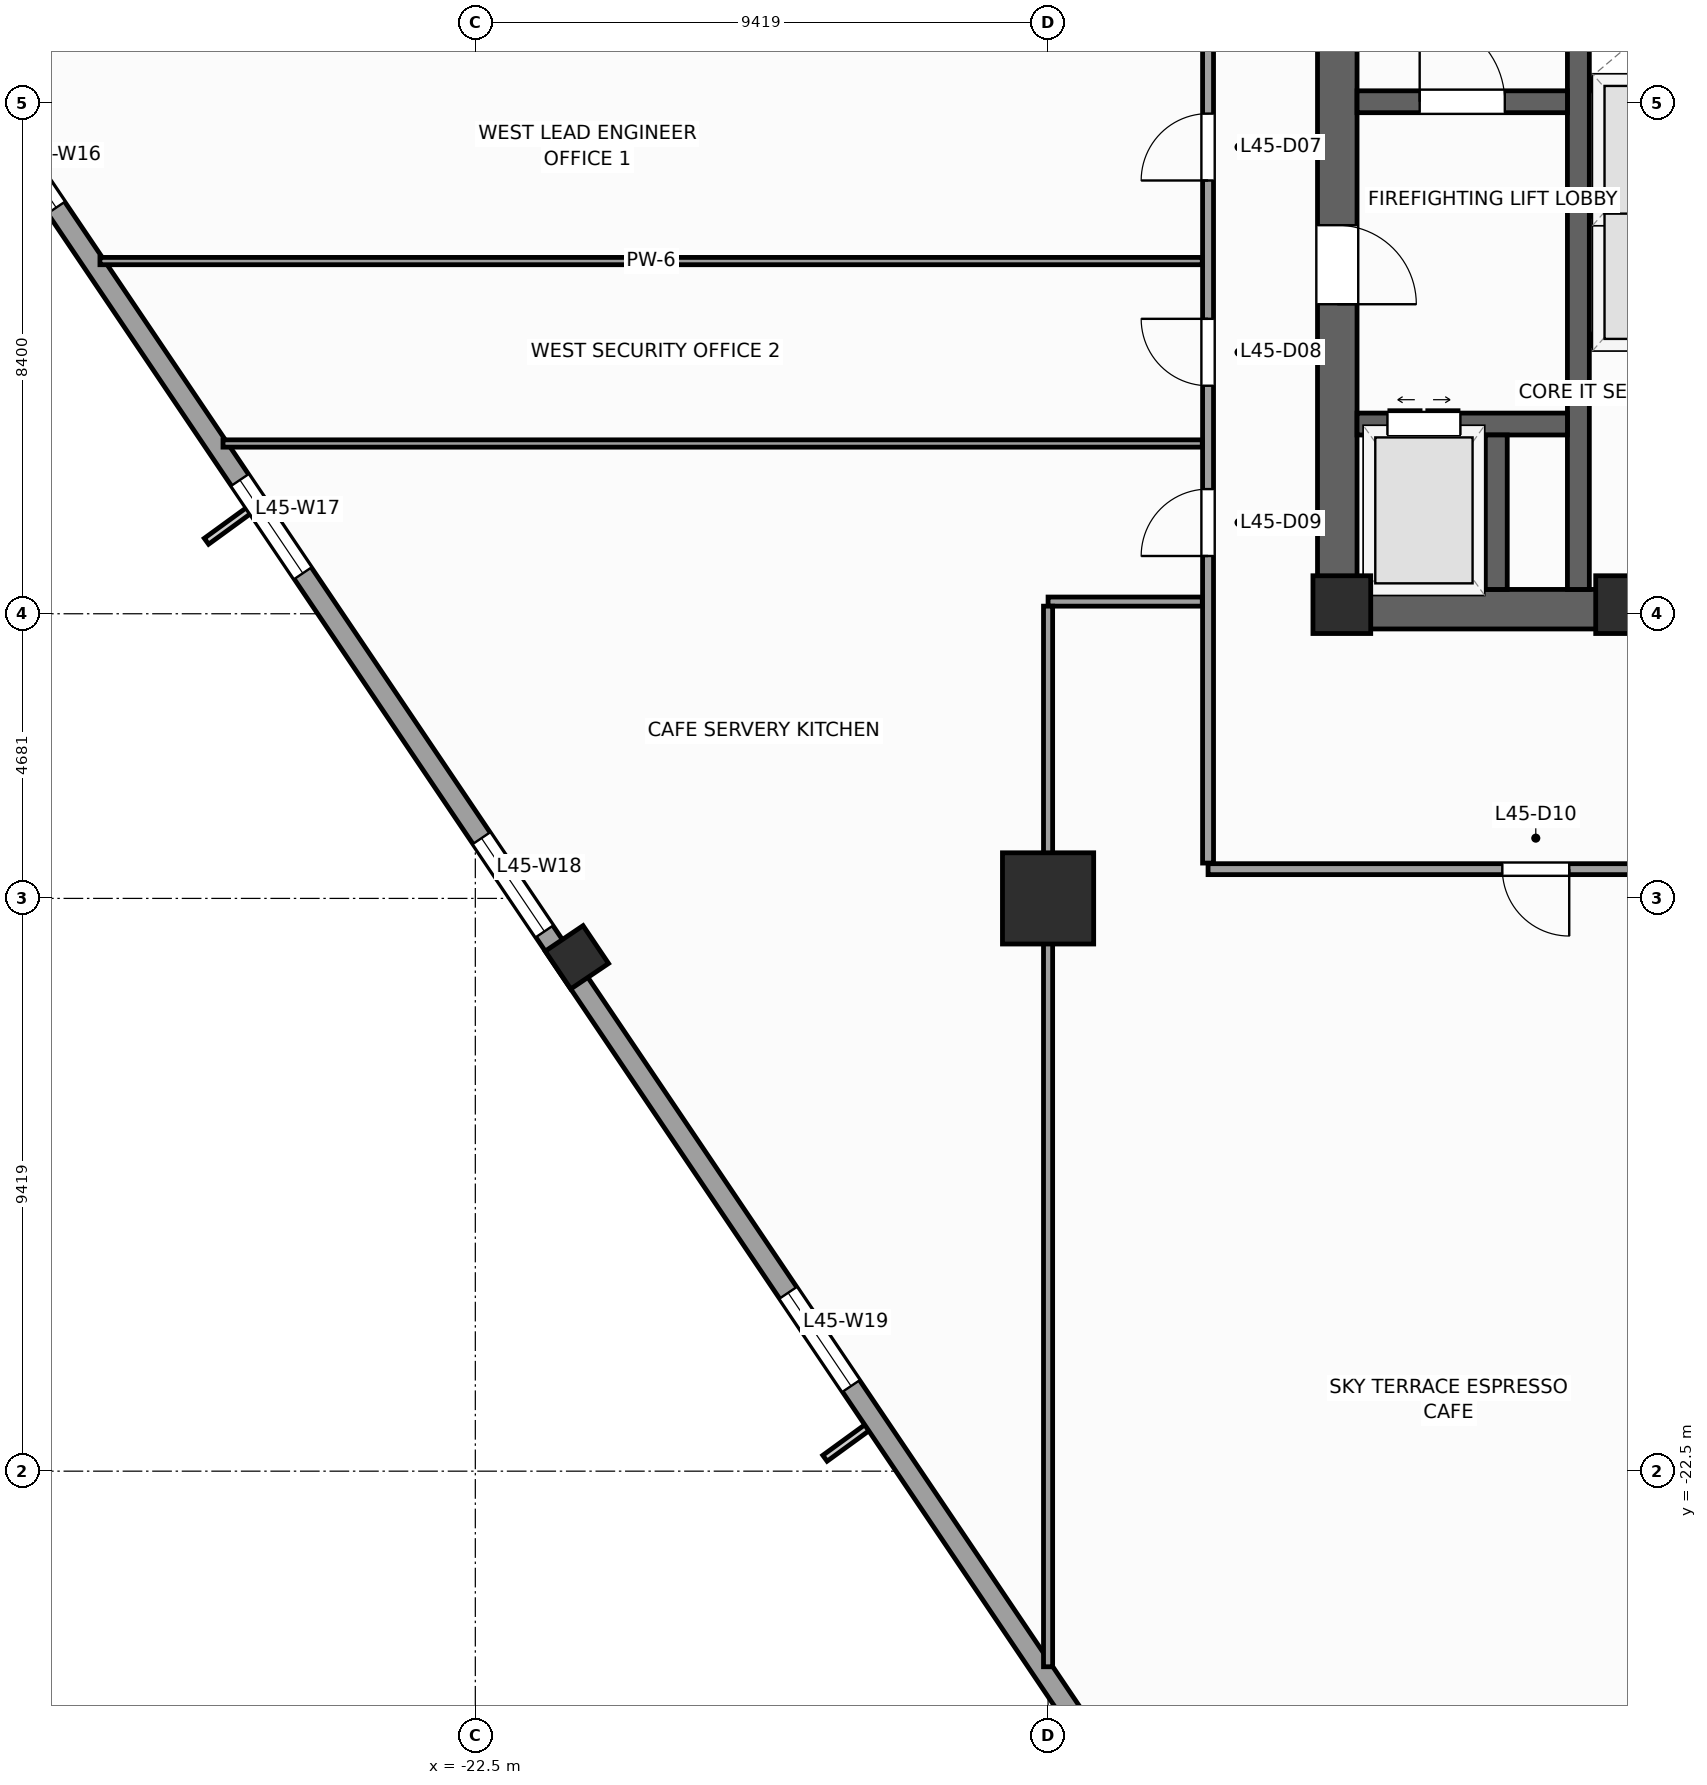
"""IFC4 building model, lengths in metres.
Left out: names, types, materials, properties, quantities, classifications, styles, units other than length and angle.
Written with IfcOpenShell. Run it as: python <this file> out.ifc"""

import sys

from ifc_helpers import new_model, si_unit, direction, frame, frame_2d, origin, origin_2d, place, context, subcontext, project, spatial, rectangle, extrude, source, transform, mapped, element, fill, save


model = new_model("IFC4")
c1 = context("Model", 3, precision=1e-05, world=origin(), true_north=direction((0.0, 1.0)))
c2 = subcontext(c1, "Body", "Model", "MODEL_VIEW")
j1 = project(units=[si_unit("LENGTHUNIT", "METRE"), si_unit("PLANEANGLEUNIT", "RADIAN")], contexts=[c1])
p1 = place(None, origin())
s1 = spatial("IfcSite", under=j1, at=p1, CompositionType="ELEMENT")
p2 = place(p1, origin())
s2 = spatial("IfcBuilding", under=s1, at=p2, CompositionType="ELEMENT")
p3 = place(p2, frame((0.0, 0.0, 188.4)))
s3 = spatial("IfcBuildingStorey", under=s2, at=p3, CompositionType="ELEMENT", Elevation=188.4)
p4 = place(p3, frame((-8.65, -8.325, 0.0), z_axis=(0.0, 0.0, 1.0), x_axis=(1.0, 0.0, 0.0)))
e1 = element("IfcWall", 1, at=p4, inside=s3, PredefinedType="SHEAR", context=c2, shape_type="SweptSolid", body=[
    extrude(rectangle(XDim=17.3, YDim=0.65, at=frame_2d((8.65, 0.0))), origin(), (0.0, 0.0, 1.0), 4.0),
])
p5 = place(p4, frame((8.0, 0.0, 0.0)))
e2 = element("IfcOpeningElement", 2, at=p5, cuts=e1, PredefinedType="OPENING", context=c2, shape_type="SweptSolid", body=[
    extrude(rectangle(XDim=1.3, YDim=2.2, at=frame_2d((0.65, 1.1))), frame((0.0, 0.335, 0.0), z_axis=(0.0, -1.0, 0.0), x_axis=(1.0, 0.0, 0.0)), (0.0, 0.0, 1.0), 0.67),
])
p6 = place(p3, frame((-8.325, -8.0, 0.0), z_axis=(0.0, 0.0, 1.0), x_axis=(0.0, 1.0, 0.0)))
e3 = element("IfcWall", 3, at=p6, inside=s3, PredefinedType="SHEAR", context=c2, shape_type="SweptSolid", body=[
    extrude(rectangle(XDim=16.0, YDim=0.65, at=frame_2d((8.0, 0.0))), origin(), (0.0, 0.0, 1.0), 4.0),
])
p7 = place(p6, frame((4.69, 0.0, 0.0)))
e4 = element("IfcOpeningElement", 4, at=p7, cuts=e3, PredefinedType="OPENING", context=c2, shape_type="SweptSolid", body=[
    extrude(rectangle(XDim=1.3, YDim=2.2, at=frame_2d((0.65, 1.1))), frame((0.0, 0.335, 0.0), z_axis=(0.0, -1.0, 0.0), x_axis=(1.0, 0.0, 0.0)), (0.0, 0.0, 1.0), 0.67),
])
p8 = place(p3, frame((-4.36, -8.0, 0.0), z_axis=(0.0, 0.0, 1.0), x_axis=(0.0, 1.0, 0.0)))
e5 = element("IfcWall", 5, at=p8, inside=s3, PredefinedType="SHEAR", context=c2, shape_type="SweptSolid", body=[
    extrude(rectangle(XDim=16.0, YDim=0.36, at=frame_2d((8.0, 0.0))), origin(), (0.0, 0.0, 1.0), 4.0),
])
p9 = place(p3, frame((-8.0, 0.02, 0.0), z_axis=(0.0, 0.0, 1.0), x_axis=(1.0, 0.0, 0.0)))
e6 = element("IfcWall", 6, at=p9, inside=s3, PredefinedType="SHEAR", context=c2, shape_type="SweptSolid", body=[
    extrude(rectangle(XDim=3.46, YDim=0.36, at=frame_2d((1.73, 0.0))), origin(), (0.0, 0.0, 1.0), 4.0),
])
p10 = place(p9, frame((1.03, 0.0, 0.0)))
e7 = element("IfcOpeningElement", 7, at=p10, cuts=e6, PredefinedType="OPENING", context=c2, shape_type="SweptSolid", body=[
    extrude(rectangle(XDim=1.4, YDim=2.2, at=frame_2d((0.7, 1.1))), frame((0.0, 0.19, 0.0), z_axis=(0.0, -1.0, 0.0), x_axis=(1.0, 0.0, 0.0)), (0.0, 0.0, 1.0), 0.38),
])
p11 = place(p3, frame((-8.0, -5.28, 0.0), z_axis=(0.0, 0.0, 1.0), x_axis=(1.0, 0.0, 0.0)))
e8 = element("IfcWall", 8, at=p11, inside=s3, PredefinedType="SHEAR", context=c2, shape_type="SweptSolid", body=[
    extrude(rectangle(XDim=3.46, YDim=0.36, at=frame_2d((1.73, 0.0))), origin(), (0.0, 0.0, 1.0), 4.0),
])
p12 = place(p11, frame((0.5, 0.0, 0.0)))
e9 = element("IfcOpeningElement", 9, at=p12, cuts=e8, PredefinedType="OPENING", context=c2, shape_type="SweptSolid", body=[
    extrude(rectangle(XDim=1.2, YDim=2.25, at=frame_2d((0.6, 1.125))), frame((0.0, 0.19, 0.0), z_axis=(0.0, -1.0, 0.0), x_axis=(1.0, 0.0, 0.0)), (0.0, 0.0, 1.0), 0.38),
])
p13 = place(p3, frame((-5.71, -8.0, 0.0), z_axis=(0.0, 0.0, 1.0), x_axis=(0.0, 1.0, 0.0)))
e10 = element("IfcWall", 10, at=p13, inside=s3, PredefinedType="SHEAR", context=c2, shape_type="SweptSolid", body=[
    extrude(rectangle(XDim=2.54, YDim=0.36, at=frame_2d((1.27, 0.0))), origin(), (0.0, 0.0, 1.0), 4.0),
])
m1 = source(origin(), c2, "Body", "SweptSolid", [
    extrude(rectangle(XDim=0.95, YDim=0.95, at=origin_2d()), origin(), (0.0, 0.0, 1.0), 4.0),
])
for number, where, z_axis, x_axis in (
    (11, (-8.25, -8.25, 0.0), (0.0, 0.0, 1.0), (1.0, 0.0, 0.0)),
    (12, (-3.6, -8.25, 0.0), (0.0, 0.0, 1.0), (1.0, 0.0, 0.0)),
):
    element("IfcColumn", number, at=place(p3, frame(where, z_axis=z_axis, x_axis=x_axis)), inside=s3, PredefinedType="PILASTER", context=c2, shape_type="MappedRepresentation", body=[
        mapped(m1, transform((0.0, 0.0, 0.0), scale=1.0)),
    ])
m2 = source(origin(), c2, "Body", "SweptSolid", [
    extrude(rectangle(XDim=1.5, YDim=1.5, at=origin_2d()), origin(), (0.0, 0.0, 1.0), 4.0),
])
p14 = place(p3, frame((-13.081, -13.081, 0.0), z_axis=(0.0, 0.0, 1.0), x_axis=(1.0, 0.0, 0.0)))
e13 = element("IfcColumn", 13, at=p14, inside=s3, PredefinedType="COLUMN", context=c2, shape_type="MappedRepresentation", body=[
    mapped(m2, transform((0.0, 0.0, 0.0), scale=1.0)),
])
m3 = source(origin(), c2, "Body", "SweptSolid", [
    extrude(rectangle(XDim=0.75, YDim=0.75, at=origin_2d()), origin(), (0.0, 0.0, 1.0), 4.0),
])
p15 = place(p3, frame((-20.83, -14.05, 0.0), z_axis=(0.0, 0.0, 1.0), x_axis=(0.829037572555, 0.559192903471, 0.0)))
e14 = element("IfcColumn", 14, at=p15, inside=s3, PredefinedType="COLUMN", context=c2, shape_type="MappedRepresentation", body=[
    mapped(m3, transform((0.0, 0.0, 0.0), scale=1.0)),
])
p16 = place(p3, frame((-32.558, 2.972, 0.0), z_axis=(0.0, 0.0, 1.0), x_axis=(0.559194910251, -0.829036218961, 0.0)))
e15 = element("IfcWall", 15, at=p16, inside=s3, PredefinedType="STANDARD", context=c2, shape_type="SweptSolid", body=[
    extrude(rectangle(XDim=41.34, YDim=0.34, at=frame_2d((20.67, 0.0))), origin(), (0.0, 0.0, 1.0), 3.04),
])
p17 = place(p16, frame((4.261, 0.0, 0.56)))
e16 = element("IfcOpeningElement", 16, at=p17, cuts=e15, PredefinedType="OPENING", context=c2, shape_type="SweptSolid", body=[
    extrude(rectangle(XDim=1.4, YDim=2.4, at=frame_2d((0.7, 1.2))), frame((0.0, 0.18, 0.0), z_axis=(0.0, -1.0, 0.0), x_axis=(1.0, 0.0, 0.0)), (0.0, 0.0, 1.0), 0.36),
])
p18 = place(p16, frame((11.064, 0.0, 0.61)))
e17 = element("IfcOpeningElement", 17, at=p18, cuts=e15, PredefinedType="OPENING", context=c2, shape_type="SweptSolid", body=[
    extrude(rectangle(XDim=1.85, YDim=2.35, at=frame_2d((0.925, 1.175))), frame((0.0, 0.18, 0.0), z_axis=(0.0, -1.0, 0.0), x_axis=(1.0, 0.0, 0.0)), (0.0, 0.0, 1.0), 0.36),
])
p19 = place(p16, frame((18.168, 0.0, 0.61)))
e18 = element("IfcOpeningElement", 18, at=p19, cuts=e15, PredefinedType="OPENING", context=c2, shape_type="SweptSolid", body=[
    extrude(rectangle(XDim=1.85, YDim=2.35, at=frame_2d((0.925, 1.175))), frame((0.0, 0.18, 0.0), z_axis=(0.0, -1.0, 0.0), x_axis=(1.0, 0.0, 0.0)), (0.0, 0.0, 1.0), 0.36),
])
p20 = place(p16, frame((27.186, 0.0, 0.61)))
e19 = element("IfcOpeningElement", 19, at=p20, cuts=e15, PredefinedType="OPENING", context=c2, shape_type="SweptSolid", body=[
    extrude(rectangle(XDim=1.85, YDim=2.35, at=frame_2d((0.925, 1.175))), frame((0.0, 0.18, 0.0), z_axis=(0.0, -1.0, 0.0), x_axis=(1.0, 0.0, 0.0)), (0.0, 0.0, 1.0), 0.36),
])
p21 = place(p16, frame((35.602, 0.0, 0.56)))
e20 = element("IfcOpeningElement", 20, at=p21, cuts=e15, PredefinedType="OPENING", context=c2, shape_type="SweptSolid", body=[
    extrude(rectangle(XDim=1.4, YDim=2.4, at=frame_2d((0.7, 1.2))), frame((0.0, 0.18, 0.0), z_axis=(0.0, -1.0, 0.0), x_axis=(1.0, 0.0, 0.0)), (0.0, 0.0, 1.0), 0.36),
])
for number, where, z_axis, x_axis in (
    (21, (-4.17, -3.9, 0.0), (0.0, 0.0, 1.0), (1.0, 0.0, 0.0)),
    (22, (-4.17, 0.3, 0.0), (0.0, 0.0, 1.0), (1.0, 0.0, 0.0)),
):
    element("IfcWall", number, at=place(p3, frame(where, z_axis=z_axis, x_axis=x_axis)), inside=s3, PredefinedType="PARTITIONING", context=c2, shape_type="SweptSolid", body=[
        extrude(rectangle(XDim=2.28, YDim=0.18, at=frame_2d((1.14, 0.0))), origin(), (0.0, 0.0, 1.0), 3.74),
    ])
p22 = place(p3, frame((-4.16, -1.8, 0.0), z_axis=(0.0, 0.0, 1.0), x_axis=(1.0, 0.0, 0.0)))
e23 = element("IfcWall", 23, at=p22, inside=s3, PredefinedType="PARTITIONING", context=c2, shape_type="SweptSolid", body=[
    extrude(rectangle(XDim=2.26, YDim=0.12, at=frame_2d((1.13, 0.0))), origin(), (0.0, 0.0, 1.0), 3.74),
])
p23 = place(p3, frame((-10.45, -12.6, 0.0), z_axis=(0.0, 0.0, 1.0), x_axis=(1.0, 0.0, 0.0)))
e24 = element("IfcWall", 24, at=p23, inside=s3, PredefinedType="PARTITIONING", context=c2, shape_type="SweptSolid", body=[
    extrude(rectangle(XDim=22.0, YDim=0.18, at=frame_2d((11.0, 0.0))), origin(), (0.0, 0.0, 1.0), 3.74),
])
p24 = place(p23, frame((11.286, 0.0, 0.0)))
e25 = element("IfcOpeningElement", 25, at=p24, cuts=e24, PredefinedType="OPENING", context=c2, shape_type="SweptSolid", body=[
    extrude(rectangle(XDim=0.95, YDim=2.1, at=frame_2d((0.475, 1.05))), frame((0.0, 0.1, 0.0), z_axis=(0.0, -1.0, 0.0), x_axis=(1.0, 0.0, 0.0)), (0.0, 0.0, 1.0), 0.2),
])
p25 = place(p23, frame((4.839, 0.0, 0.0)))
e26 = element("IfcOpeningElement", 26, at=p25, cuts=e24, PredefinedType="OPENING", context=c2, shape_type="SweptSolid", body=[
    extrude(rectangle(XDim=1.1, YDim=2.2, at=frame_2d((0.55, 1.1))), frame((0.0, 0.1, 0.0), z_axis=(0.0, -1.0, 0.0), x_axis=(1.0, 0.0, 0.0)), (0.0, 0.0, 1.0), 0.2),
])
p26 = place(p23, frame((16.66, 0.0, 0.0)))
e27 = element("IfcOpeningElement", 27, at=p26, cuts=e24, PredefinedType="OPENING", context=c2, shape_type="SweptSolid", body=[
    extrude(rectangle(XDim=1.1, YDim=2.2, at=frame_2d((0.55, 1.1))), frame((0.0, 0.1, 0.0), z_axis=(0.0, -1.0, 0.0), x_axis=(1.0, 0.0, 0.0)), (0.0, 0.0, 1.0), 0.2),
])
p27 = place(p3, frame((-10.45, -12.5, 0.0), z_axis=(0.0, 0.0, 1.0), x_axis=(0.0, 1.0, 0.0)))
e28 = element("IfcWall", 28, at=p27, inside=s3, PredefinedType="PARTITIONING", context=c2, shape_type="SweptSolid", body=[
    extrude(rectangle(XDim=16.3, YDim=0.18, at=frame_2d((8.15, 0.0))), origin(), (0.0, 0.0, 1.0), 3.74),
])
p28 = place(p27, frame((14.26, 0.0, 0.0)))
e29 = element("IfcOpeningElement", 29, at=p28, cuts=e28, PredefinedType="OPENING", context=c2, shape_type="SweptSolid", body=[
    extrude(rectangle(XDim=1.1, YDim=2.2, at=frame_2d((0.55, 1.1))), frame((0.0, 0.1, 0.0), z_axis=(0.0, -1.0, 0.0), x_axis=(1.0, 0.0, 0.0)), (0.0, 0.0, 1.0), 0.2),
])
p29 = place(p27, frame((11.225, 0.0, 0.0)))
e30 = element("IfcOpeningElement", 30, at=p29, cuts=e28, PredefinedType="OPENING", context=c2, shape_type="SweptSolid", body=[
    extrude(rectangle(XDim=1.1, YDim=2.2, at=frame_2d((0.55, 1.1))), frame((0.0, 0.1, 0.0), z_axis=(0.0, -1.0, 0.0), x_axis=(1.0, 0.0, 0.0)), (0.0, 0.0, 1.0), 0.2),
])
p30 = place(p27, frame((7.85, 0.0, 0.0)))
e31 = element("IfcOpeningElement", 31, at=p30, cuts=e28, PredefinedType="OPENING", context=c2, shape_type="SweptSolid", body=[
    extrude(rectangle(XDim=1.1, YDim=2.2, at=frame_2d((0.55, 1.1))), frame((0.0, 0.1, 0.0), z_axis=(0.0, -1.0, 0.0), x_axis=(1.0, 0.0, 0.0)), (0.0, 0.0, 1.0), 0.2),
])
p31 = place(p27, frame((5.05, 0.0, 0.0)))
e32 = element("IfcOpeningElement", 32, at=p31, cuts=e28, PredefinedType="OPENING", context=c2, shape_type="SweptSolid", body=[
    extrude(rectangle(XDim=1.1, YDim=2.2, at=frame_2d((0.55, 1.1))), frame((0.0, 0.1, 0.0), z_axis=(0.0, -1.0, 0.0), x_axis=(1.0, 0.0, 0.0)), (0.0, 0.0, 1.0), 0.2),
])
p32 = place(p3, frame((-10.545, -8.2, 0.0), z_axis=(0.0, 0.0, 1.0), x_axis=(-1.0, 0.0, 0.0)))
e33 = element("IfcWall", 33, at=p32, inside=s3, PredefinedType="PARTITIONING", context=c2, shape_type="SweptSolid", body=[
    extrude(rectangle(XDim=2.536, YDim=0.15, at=frame_2d((1.268, 0.0))), origin(), (0.0, 0.0, 1.0), 3.74),
])
p33 = place(p3, frame((-13.081, -8.275, 0.0), z_axis=(0.0, 0.0, 1.0), x_axis=(0.0, -1.0, 0.0)))
e34 = element("IfcWall", 34, at=p33, inside=s3, PredefinedType="PARTITIONING", context=c2, shape_type="SweptSolid", body=[
    extrude(rectangle(XDim=17.441, YDim=0.15, at=frame_2d((8.721, 0.0))), origin(), (0.0, 0.0, 1.0), 2.84),
])
p34 = place(p3, frame((-28.673, -2.6, 0.0), z_axis=(0.0, 0.0, 1.0), x_axis=(1.0, 0.0, 0.0)))
e35 = element("IfcWall", 35, at=p34, inside=s3, PredefinedType="PARTITIONING", context=c2, shape_type="SweptSolid", body=[
    extrude(rectangle(XDim=18.128, YDim=0.12, at=frame_2d((9.064, 0.0))), origin(), (0.0, 0.0, 1.0), 3.74),
])
p35 = place(p3, frame((-26.65, -5.6, 0.0), z_axis=(0.0, 0.0, 1.0), x_axis=(1.0, 0.0, 0.0)))
e36 = element("IfcWall", 36, at=p35, inside=s3, PredefinedType="PARTITIONING", context=c2, shape_type="SweptSolid", body=[
    extrude(rectangle(XDim=16.105, YDim=0.12, at=frame_2d((8.052, 0.0))), origin(), (0.0, 0.0, 1.0), 3.74),
])
m4 = source(origin(), c2, "Body", "SweptSolid", [
    extrude(rectangle(XDim=1.4, YDim=2.4, at=frame_2d((0.7, 1.2))), frame((0.0, 0.03, 0.0), z_axis=(0.0, -1.0, 0.0), x_axis=(1.0, 0.0, 0.0)), (0.0, 0.0, 1.0), 0.06),
])
p36 = place(p17, origin())
e37 = element("IfcWindow", 37, at=p36, inside=s3, PartitioningType="SINGLE_PANEL", PredefinedType="WINDOW", context=c2, shape_type="MappedRepresentation", body=[
    mapped(m4, transform((0.0, 0.0, 0.0), scale=1.0)),
])
fill(e16, e37)
m5 = source(origin(), c2, "Body", "SweptSolid", [
    extrude(rectangle(XDim=1.85, YDim=2.35, at=frame_2d((0.925, 1.175))), frame((0.0, 0.03, 0.0), z_axis=(0.0, -1.0, 0.0), x_axis=(1.0, 0.0, 0.0)), (0.0, 0.0, 1.0), 0.06),
])
p37 = place(p18, origin())
e38 = element("IfcWindow", 38, at=p37, inside=s3, PartitioningType="SINGLE_PANEL", PredefinedType="WINDOW", context=c2, shape_type="MappedRepresentation", body=[
    mapped(m5, transform((0.0, 0.0, 0.0), scale=1.0)),
])
fill(e17, e38)
p38 = place(p19, origin())
e39 = element("IfcWindow", 39, at=p38, inside=s3, PartitioningType="SINGLE_PANEL", PredefinedType="WINDOW", context=c2, shape_type="MappedRepresentation", body=[
    mapped(m5, transform((0.0, 0.0, 0.0), scale=1.0)),
])
fill(e18, e39)
p39 = place(p20, origin())
e40 = element("IfcWindow", 40, at=p39, inside=s3, PartitioningType="SINGLE_PANEL", PredefinedType="WINDOW", context=c2, shape_type="MappedRepresentation", body=[
    mapped(m5, transform((0.0, 0.0, 0.0), scale=1.0)),
])
fill(e19, e40)
m6 = source(origin(), c2, "Body", "SweptSolid", [
    extrude(rectangle(XDim=1.4, YDim=2.2, at=frame_2d((0.7, 1.1))), frame((0.0, 0.025, 0.0), z_axis=(0.0, -1.0, 0.0), x_axis=(1.0, 0.0, 0.0)), (0.0, 0.0, 1.0), 0.05),
])
p40 = place(p10, origin())
e41 = element("IfcDoor", 41, at=p40, inside=s3, OperationType="SINGLE_SWING_LEFT", PredefinedType="DOOR", context=c2, shape_type="MappedRepresentation", body=[
    mapped(m6, transform((0.0, 0.0, 0.0), scale=1.0)),
])
fill(e7, e41)
m7 = source(origin(), c2, "Body", "SweptSolid", [
    extrude(rectangle(XDim=1.3, YDim=2.2, at=frame_2d((0.65, 1.1))), frame((0.0, 0.025, 0.0), z_axis=(0.0, -1.0, 0.0), x_axis=(1.0, 0.0, 0.0)), (0.0, 0.0, 1.0), 0.05),
])
p41 = place(p7, frame((1.3, 0.0, 0.0), z_axis=(0.0, 0.0, 1.0), x_axis=(-1.0, 0.0, 0.0)))
e42 = element("IfcDoor", 42, at=p41, inside=s3, OperationType="SINGLE_SWING_LEFT", PredefinedType="DOOR", context=c2, shape_type="MappedRepresentation", body=[
    mapped(m7, transform((0.0, 0.0, 0.0), scale=1.0)),
])
fill(e4, e42)
m8 = source(origin(), c2, "Body", "SweptSolid", [
    extrude(rectangle(XDim=1.2, YDim=2.25, at=frame_2d((0.6, 1.125))), frame((0.0, 0.025, 0.0), z_axis=(0.0, -1.0, 0.0), x_axis=(1.0, 0.0, 0.0)), (0.0, 0.0, 1.0), 0.05),
])
p42 = place(p12, origin())
e43 = element("IfcDoor", 43, at=p42, inside=s3, OperationType="DOUBLE_DOOR_SLIDING", PredefinedType="DOOR", context=c2, shape_type="MappedRepresentation", body=[
    mapped(m8, transform((0.0, 0.0, 0.0), scale=1.0)),
])
fill(e9, e43)
m9 = source(origin(), c2, "Body", "SweptSolid", [
    extrude(rectangle(XDim=1.1, YDim=2.2, at=frame_2d((0.55, 1.1))), frame((0.0, 0.025, 0.0), z_axis=(0.0, -1.0, 0.0), x_axis=(1.0, 0.0, 0.0)), (0.0, 0.0, 1.0), 0.05),
])
p43 = place(p29, origin())
e44 = element("IfcDoor", 44, at=p43, inside=s3, OperationType="SINGLE_SWING_LEFT", PredefinedType="DOOR", context=c2, shape_type="MappedRepresentation", body=[
    mapped(m9, transform((0.0, 0.0, 0.0), scale=1.0)),
])
fill(e30, e44)
p44 = place(p30, origin())
e45 = element("IfcDoor", 45, at=p44, inside=s3, OperationType="SINGLE_SWING_RIGHT", PredefinedType="DOOR", context=c2, shape_type="MappedRepresentation", body=[
    mapped(m9, transform((0.0, 0.0, 0.0), scale=1.0)),
])
fill(e31, e45)
p45 = place(p31, origin())
e46 = element("IfcDoor", 46, at=p45, inside=s3, OperationType="SINGLE_SWING_LEFT", PredefinedType="DOOR", context=c2, shape_type="MappedRepresentation", body=[
    mapped(m9, transform((0.0, 0.0, 0.0), scale=1.0)),
])
fill(e32, e46)
p46 = place(p25, frame((1.1, 0.0, 0.0), z_axis=(0.0, 0.0, 1.0), x_axis=(-1.0, 0.0, 0.0)))
e47 = element("IfcDoor", 47, at=p46, inside=s3, OperationType="SINGLE_SWING_RIGHT", PredefinedType="DOOR", context=c2, shape_type="MappedRepresentation", body=[
    mapped(m9, transform((0.0, 0.0, 0.0), scale=1.0)),
])
fill(e26, e47)
save(model, sys.argv[1])
